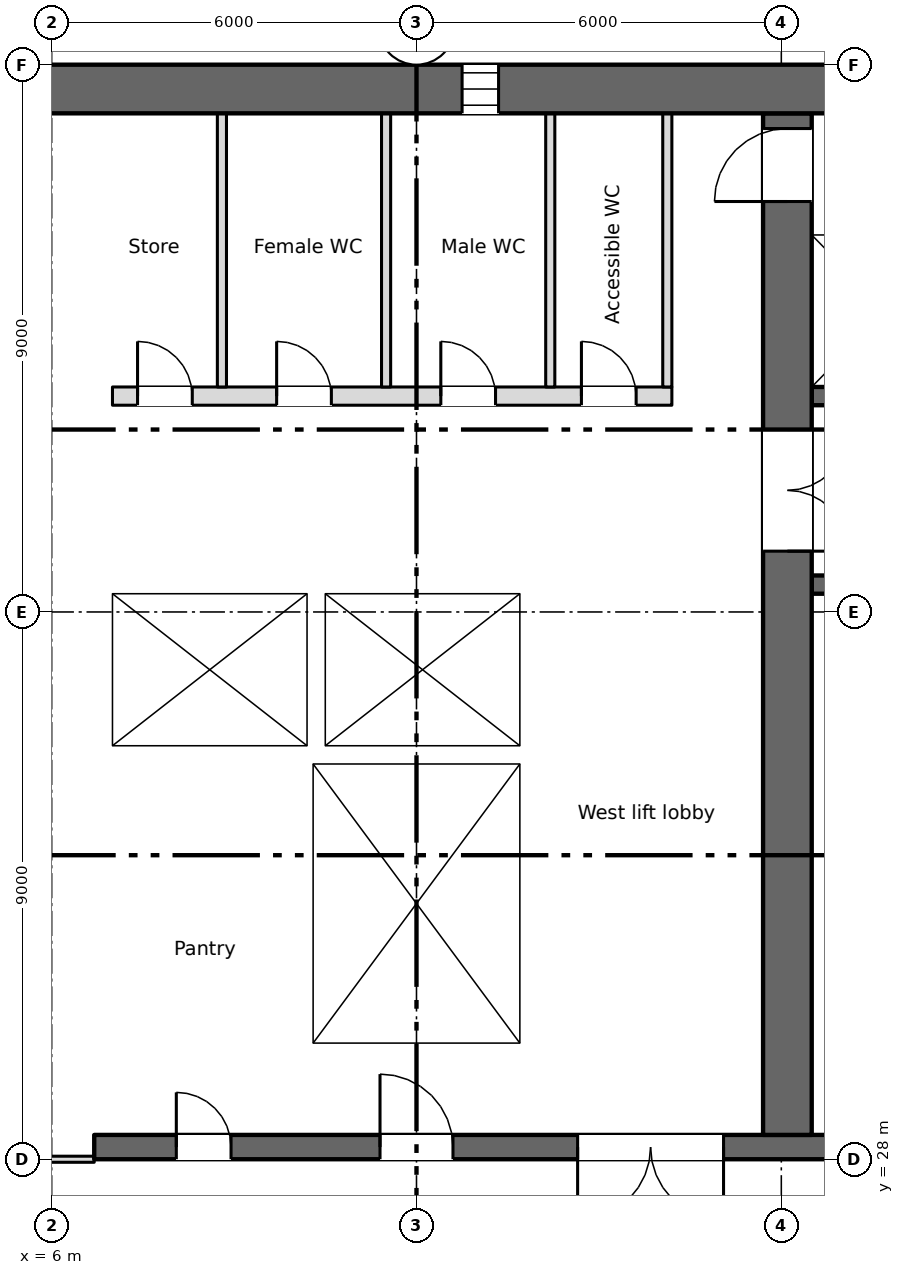
"""IFC4 building model, lengths in metres.
Left out: names, types, materials, properties, quantities, classifications, styles, units other than length and angle.
Written with IfcOpenShell. Run it as: python <this file> out.ifc"""

import sys

from ifc_helpers import new_model, si_unit, direction, frame, frame_2d, origin, place, context, subcontext, project, spatial, rectangle, extrude, element, fill, save


model = new_model("IFC4")
c1 = context("Model", 3, precision=1e-05, world=origin(), true_north=direction((0.0, 1.0)))
c2 = subcontext(c1, "Body", "Model", "MODEL_VIEW")
j1 = project(units=[si_unit("LENGTHUNIT", "METRE"), si_unit("PLANEANGLEUNIT", "RADIAN")], contexts=[c1])
p1 = place(None, origin())
s1 = spatial("IfcSite", under=j1, at=p1, CompositionType="ELEMENT")
p2 = place(p1, origin())
s2 = spatial("IfcBuilding", under=s1, at=p2, CompositionType="ELEMENT")
p3 = place(p2, frame((0.0, 0.0, 125.0)))
s3 = spatial("IfcBuildingStorey", under=s2, at=p3, CompositionType="ELEMENT", Elevation=125.0)
p4 = place(p3, frame((5.55, 45.6, 0.0), z_axis=(0.0, 0.0, 1.0), x_axis=(1.0, 0.0, 0.0)))
e1 = element("IfcWall", 1, at=p4, inside=s3, PredefinedType="SHEAR", context=c2, shape_type="SweptSolid", body=[
    extrude(rectangle(XDim=60.9, YDim=0.8, at=frame_2d((30.45, 0.0))), origin(), (0.0, 0.0, 1.0), 3.35),
])
p5 = place(p4, frame((7.2, 0.0, 0.6)))
e2 = element("IfcOpeningElement", 2, at=p5, cuts=e1, PredefinedType="OPENING", context=c2, shape_type="SweptSolid", body=[
    extrude(rectangle(XDim=0.6, YDim=2.4, at=frame_2d((0.3, 1.2))), frame((0.0, 0.41, 0.0), z_axis=(0.0, -1.0, 0.0), x_axis=(1.0, 0.0, 0.0)), (0.0, 0.0, 1.0), 0.82),
])
p6 = place(p3, frame((6.7, 28.2, 0.0), z_axis=(0.0, 0.0, 1.0), x_axis=(1.0, 0.0, 0.0)))
e3 = element("IfcWall", 3, at=p6, inside=s3, PredefinedType="SHEAR", context=c2, shape_type="SweptSolid", body=[
    extrude(rectangle(XDim=57.8, YDim=0.4, at=frame_2d((28.9, 0.0))), origin(), (0.0, 0.0, 1.0), 3.35),
])
p7 = place(p6, frame((12.062, 0.0, 0.0)))
e4 = element("IfcOpeningElement", 4, at=p7, cuts=e3, PredefinedType="OPENING", context=c2, shape_type="SweptSolid", body=[
    extrude(rectangle(XDim=0.9, YDim=2.1, at=frame_2d((0.45, 1.05))), frame((0.0, 0.21, 0.0), z_axis=(0.0, -1.0, 0.0), x_axis=(1.0, 0.0, 0.0)), (0.0, 0.0, 1.0), 0.42),
])
p8 = place(p6, frame((14.637, 0.0, 0.0)))
e5 = element("IfcOpeningElement", 5, at=p8, cuts=e3, PredefinedType="OPENING", context=c2, shape_type="SweptSolid", body=[
    extrude(rectangle(XDim=0.9, YDim=2.1, at=frame_2d((0.45, 1.05))), frame((0.0, 0.21, 0.0), z_axis=(0.0, -1.0, 0.0), x_axis=(1.0, 0.0, 0.0)), (0.0, 0.0, 1.0), 0.42),
])
p9 = place(p6, frame((49.062, 0.0, 0.0)))
e6 = element("IfcOpeningElement", 6, at=p9, cuts=e3, PredefinedType="OPENING", context=c2, shape_type="SweptSolid", body=[
    extrude(rectangle(XDim=0.9, YDim=2.1, at=frame_2d((0.45, 1.05))), frame((0.0, 0.21, 0.0), z_axis=(0.0, -1.0, 0.0), x_axis=(1.0, 0.0, 0.0)), (0.0, 0.0, 1.0), 0.42),
])
p10 = place(p6, frame((51.637, 0.0, 0.0)))
e7 = element("IfcOpeningElement", 7, at=p10, cuts=e3, PredefinedType="OPENING", context=c2, shape_type="SweptSolid", body=[
    extrude(rectangle(XDim=0.9, YDim=2.1, at=frame_2d((0.45, 1.05))), frame((0.0, 0.21, 0.0), z_axis=(0.0, -1.0, 0.0), x_axis=(1.0, 0.0, 0.0)), (0.0, 0.0, 1.0), 0.42),
])
p11 = place(p6, frame((1.35, 0.0, 0.0)))
e8 = element("IfcOpeningElement", 8, at=p11, cuts=e3, PredefinedType="OPENING", context=c2, shape_type="SweptSolid", body=[
    extrude(rectangle(XDim=0.9, YDim=2.1, at=frame_2d((0.45, 1.05))), frame((0.0, 0.21, 0.0), z_axis=(0.0, -1.0, 0.0), x_axis=(1.0, 0.0, 0.0)), (0.0, 0.0, 1.0), 0.42),
])
p12 = place(p6, frame((4.7, 0.0, 0.0)))
e9 = element("IfcOpeningElement", 9, at=p12, cuts=e3, PredefinedType="OPENING", context=c2, shape_type="SweptSolid", body=[
    extrude(rectangle(XDim=1.2, YDim=2.1, at=frame_2d((0.6, 1.05))), frame((0.0, 0.21, 0.0), z_axis=(0.0, -1.0, 0.0), x_axis=(1.0, 0.0, 0.0)), (0.0, 0.0, 1.0), 0.42),
])
p13 = place(p6, frame((31.7, 0.0, 0.0)))
e10 = element("IfcOpeningElement", 10, at=p13, cuts=e3, PredefinedType="OPENING", context=c2, shape_type="SweptSolid", body=[
    extrude(rectangle(XDim=1.2, YDim=2.1, at=frame_2d((0.6, 1.05))), frame((0.0, 0.21, 0.0), z_axis=(0.0, -1.0, 0.0), x_axis=(1.0, 0.0, 0.0)), (0.0, 0.0, 1.0), 0.42),
])
p14 = place(p6, frame((55.2, 0.0, 0.0)))
e11 = element("IfcOpeningElement", 11, at=p14, cuts=e3, PredefinedType="OPENING", context=c2, shape_type="SweptSolid", body=[
    extrude(rectangle(XDim=1.2, YDim=2.1, at=frame_2d((0.6, 1.05))), frame((0.0, 0.21, 0.0), z_axis=(0.0, -1.0, 0.0), x_axis=(1.0, 0.0, 0.0)), (0.0, 0.0, 1.0), 0.42),
])
p15 = place(p6, frame((21.7, 0.0, 0.0)))
e12 = element("IfcOpeningElement", 12, at=p15, cuts=e3, PredefinedType="OPENING", context=c2, shape_type="SweptSolid", body=[
    extrude(rectangle(XDim=1.2, YDim=2.1, at=frame_2d((0.6, 1.05))), frame((0.0, 0.21, 0.0), z_axis=(0.0, -1.0, 0.0), x_axis=(1.0, 0.0, 0.0)), (0.0, 0.0, 1.0), 0.42),
])
p16 = place(p6, frame((41.7, 0.0, 0.0)))
e13 = element("IfcOpeningElement", 13, at=p16, cuts=e3, PredefinedType="OPENING", context=c2, shape_type="SweptSolid", body=[
    extrude(rectangle(XDim=1.2, YDim=2.1, at=frame_2d((0.6, 1.05))), frame((0.0, 0.21, 0.0), z_axis=(0.0, -1.0, 0.0), x_axis=(1.0, 0.0, 0.0)), (0.0, 0.0, 1.0), 0.42),
])
p17 = place(p6, frame((24.85, 0.0, 0.0)))
e14 = element("IfcOpeningElement", 14, at=p17, cuts=e3, PredefinedType="OPENING", context=c2, shape_type="SweptSolid", body=[
    extrude(rectangle(XDim=2.4, YDim=2.1, at=frame_2d((1.2, 1.05))), frame((0.0, 0.21, 0.0), z_axis=(0.0, -1.0, 0.0), x_axis=(1.0, 0.0, 0.0)), (0.0, 0.0, 1.0), 0.42),
])
p18 = place(p6, frame((37.35, 0.0, 0.0)))
e15 = element("IfcOpeningElement", 15, at=p18, cuts=e3, PredefinedType="OPENING", context=c2, shape_type="SweptSolid", body=[
    extrude(rectangle(XDim=2.4, YDim=2.1, at=frame_2d((1.2, 1.05))), frame((0.0, 0.21, 0.0), z_axis=(0.0, -1.0, 0.0), x_axis=(1.0, 0.0, 0.0)), (0.0, 0.0, 1.0), 0.42),
])
p19 = place(p6, frame((7.95, 0.0, 0.0)))
e16 = element("IfcOpeningElement", 16, at=p19, cuts=e3, PredefinedType="OPENING", context=c2, shape_type="SweptSolid", body=[
    extrude(rectangle(XDim=2.4, YDim=2.1, at=frame_2d((1.2, 1.05))), frame((0.0, 0.21, 0.0), z_axis=(0.0, -1.0, 0.0), x_axis=(1.0, 0.0, 0.0)), (0.0, 0.0, 1.0), 0.42),
])
p20 = place(p6, frame((28.85, 0.0, 0.0)))
e17 = element("IfcOpeningElement", 17, at=p20, cuts=e3, PredefinedType="OPENING", context=c2, shape_type="SweptSolid", body=[
    extrude(rectangle(XDim=0.9, YDim=2.1, at=frame_2d((0.45, 1.05))), frame((0.0, 0.21, 0.0), z_axis=(0.0, -1.0, 0.0), x_axis=(1.0, 0.0, 0.0)), (0.0, 0.0, 1.0), 0.42),
])
p21 = place(p6, frame((34.85, 0.0, 0.0)))
e18 = element("IfcOpeningElement", 18, at=p21, cuts=e3, PredefinedType="OPENING", context=c2, shape_type="SweptSolid", body=[
    extrude(rectangle(XDim=0.9, YDim=2.1, at=frame_2d((0.45, 1.05))), frame((0.0, 0.21, 0.0), z_axis=(0.0, -1.0, 0.0), x_axis=(1.0, 0.0, 0.0)), (0.0, 0.0, 1.0), 0.42),
])
p22 = place(p3, frame((6.85, 28.4, 0.0), z_axis=(0.0, 0.0, 1.0), x_axis=(0.0, 1.0, 0.0)))
e19 = element("IfcWall", 19, at=p22, inside=s3, PredefinedType="SHEAR", context=c2, shape_type="SweptSolid", body=[
    extrude(rectangle(XDim=16.8, YDim=0.3, at=frame_2d((8.4, 0.0))), origin(), (0.0, 0.0, 1.0), 3.35),
])
p23 = place(p3, frame((18.1, 28.4, 0.0), z_axis=(0.0, 0.0, 1.0), x_axis=(0.0, 1.0, 0.0)))
e20 = element("IfcWall", 20, at=p23, inside=s3, PredefinedType="SHEAR", context=c2, shape_type="SweptSolid", body=[
    extrude(rectangle(XDim=16.8, YDim=0.8, at=frame_2d((8.4, 0.0))), origin(), (0.0, 0.0, 1.0), 3.35),
])
p24 = place(p23, frame((9.6, 0.0, 0.0)))
e21 = element("IfcOpeningElement", 21, at=p24, cuts=e20, PredefinedType="OPENING", context=c2, shape_type="SweptSolid", body=[
    extrude(rectangle(XDim=2.0, YDim=2.1, at=frame_2d((1.0, 1.05))), frame((0.0, 0.41, 0.0), z_axis=(0.0, -1.0, 0.0), x_axis=(1.0, 0.0, 0.0)), (0.0, 0.0, 1.0), 0.82),
])
p25 = place(p23, frame((15.35, 0.0, 0.0)))
e22 = element("IfcOpeningElement", 22, at=p25, cuts=e20, PredefinedType="OPENING", context=c2, shape_type="SweptSolid", body=[
    extrude(rectangle(XDim=1.2, YDim=2.1, at=frame_2d((0.6, 1.05))), frame((0.0, 0.41, 0.0), z_axis=(0.0, -1.0, 0.0), x_axis=(1.0, 0.0, 0.0)), (0.0, 0.0, 1.0), 0.82),
])
for number, where, z_axis, x_axis in (
    (23, (10.15, 28.4, 0.0), (0.0, 0.0, 1.0), (0.0, 1.0, 0.0)),
    (24, (13.85, 28.4, 0.0), (0.0, 0.0, 1.0), (0.0, 1.0, 0.0)),
):
    element("IfcWall", number, at=place(p3, frame(where, z_axis=z_axis, x_axis=x_axis)), inside=s3, PredefinedType="SHEAR", context=c2, shape_type="SweptSolid", body=[
        extrude(rectangle(XDim=6.1, YDim=0.3, at=frame_2d((3.05, 0.0))), origin(), (0.0, 0.0, 1.0), 3.35),
    ])
p26 = place(p3, frame((7.0, 34.65, 0.0), z_axis=(0.0, 0.0, 1.0), x_axis=(1.0, 0.0, 0.0)))
e25 = element("IfcWall", 25, at=p26, inside=s3, PredefinedType="SHEAR", context=c2, shape_type="SweptSolid", body=[
    extrude(rectangle(XDim=7.0, YDim=0.3, at=frame_2d((3.5, 0.0))), origin(), (0.0, 0.0, 1.0), 3.35),
])
p27 = place(p3, frame((18.5, 34.65, 0.0), z_axis=(0.0, 0.0, 1.0), x_axis=(1.0, 0.0, 0.0)))
e26 = element("IfcWall", 26, at=p27, inside=s3, PredefinedType="SHEAR", context=c2, shape_type="SweptSolid", body=[
    extrude(rectangle(XDim=12.2, YDim=0.3, at=frame_2d((6.1, 0.0))), origin(), (0.0, 0.0, 1.0), 3.35),
])
p28 = place(p27, frame((9.8, 0.0, 0.0)))
e27 = element("IfcOpeningElement", 27, at=p28, cuts=e26, PredefinedType="OPENING", context=c2, shape_type="SweptSolid", body=[
    extrude(rectangle(XDim=1.1, YDim=2.1, at=frame_2d((0.55, 1.05))), frame((0.0, 0.16, 0.0), z_axis=(0.0, -1.0, 0.0), x_axis=(1.0, 0.0, 0.0)), (0.0, 0.0, 1.0), 0.32),
])
p29 = place(p3, frame((7.0, 37.45, 0.0), z_axis=(0.0, 0.0, 1.0), x_axis=(1.0, 0.0, 0.0)))
e28 = element("IfcWall", 28, at=p29, inside=s3, PredefinedType="SHEAR", context=c2, shape_type="SweptSolid", body=[
    extrude(rectangle(XDim=7.0, YDim=0.3, at=frame_2d((3.5, 0.0))), origin(), (0.0, 0.0, 1.0), 3.35),
])
p30 = place(p3, frame((30.7, 37.45, 0.0), z_axis=(0.0, 0.0, 1.0), x_axis=(-1.0, 0.0, 0.0)))
e29 = element("IfcWall", 29, at=p30, inside=s3, PredefinedType="SHEAR", context=c2, shape_type="SweptSolid", body=[
    extrude(rectangle(XDim=12.2, YDim=0.3, at=frame_2d((6.1, 0.0))), origin(), (0.0, 0.0, 1.0), 3.35),
])
p31 = place(p30, frame((7.4, 0.0, 0.0)))
e30 = element("IfcOpeningElement", 30, at=p31, cuts=e29, PredefinedType="OPENING", context=c2, shape_type="SweptSolid", body=[
    extrude(rectangle(XDim=0.9, YDim=2.1, at=frame_2d((0.45, 1.05))), frame((0.0, 0.16, 0.0), z_axis=(0.0, -1.0, 0.0), x_axis=(1.0, 0.0, 0.0)), (0.0, 0.0, 1.0), 0.32),
])
p32 = place(p3, frame((13.85, 34.8, 0.0), z_axis=(0.0, 0.0, 1.0), x_axis=(0.0, 1.0, 0.0)))
e31 = element("IfcWall", 31, at=p32, inside=s3, PredefinedType="SHEAR", context=c2, shape_type="SweptSolid", body=[
    extrude(rectangle(XDim=2.5, YDim=0.3, at=frame_2d((1.25, 0.0))), origin(), (0.0, 0.0, 1.0), 3.35),
])
p33 = place(p3, frame((18.5, 40.55, 0.0), z_axis=(0.0, 0.0, 1.0), x_axis=(1.0, 0.0, 0.0)))
e32 = element("IfcWall", 32, at=p33, inside=s3, PredefinedType="SHEAR", context=c2, shape_type="SweptSolid", body=[
    extrude(rectangle(XDim=41.0, YDim=0.3, at=frame_2d((20.5, 0.0))), origin(), (0.0, 0.0, 1.0), 3.35),
])
p34 = place(p33, frame((18.65, 0.0, 0.0)))
e33 = element("IfcOpeningElement", 33, at=p34, cuts=e32, PredefinedType="OPENING", context=c2, shape_type="SweptSolid", body=[
    extrude(rectangle(XDim=0.9, YDim=2.1, at=frame_2d((0.45, 1.05))), frame((0.0, 0.16, 0.0), z_axis=(0.0, -1.0, 0.0), x_axis=(1.0, 0.0, 0.0)), (0.0, 0.0, 1.0), 0.32),
])
p35 = place(p33, frame((6.175, 0.0, 0.0)))
e34 = element("IfcOpeningElement", 34, at=p35, cuts=e32, PredefinedType="OPENING", context=c2, shape_type="SweptSolid", body=[
    extrude(rectangle(XDim=1.1, YDim=2.1, at=frame_2d((0.55, 1.05))), frame((0.0, 0.16, 0.0), z_axis=(0.0, -1.0, 0.0), x_axis=(1.0, 0.0, 0.0)), (0.0, 0.0, 1.0), 0.32),
])
p36 = place(p33, frame((8.925, 0.0, 0.0)))
e35 = element("IfcOpeningElement", 35, at=p36, cuts=e32, PredefinedType="OPENING", context=c2, shape_type="SweptSolid", body=[
    extrude(rectangle(XDim=1.1, YDim=2.1, at=frame_2d((0.55, 1.05))), frame((0.0, 0.16, 0.0), z_axis=(0.0, -1.0, 0.0), x_axis=(1.0, 0.0, 0.0)), (0.0, 0.0, 1.0), 0.32),
])
p37 = place(p33, frame((11.675, 0.0, 0.0)))
e36 = element("IfcOpeningElement", 36, at=p37, cuts=e32, PredefinedType="OPENING", context=c2, shape_type="SweptSolid", body=[
    extrude(rectangle(XDim=1.1, YDim=2.1, at=frame_2d((0.55, 1.05))), frame((0.0, 0.16, 0.0), z_axis=(0.0, -1.0, 0.0), x_axis=(1.0, 0.0, 0.0)), (0.0, 0.0, 1.0), 0.32),
])
p38 = place(p33, frame((30.925, 0.0, 0.0)))
e37 = element("IfcOpeningElement", 37, at=p38, cuts=e32, PredefinedType="OPENING", context=c2, shape_type="SweptSolid", body=[
    extrude(rectangle(XDim=1.1, YDim=2.1, at=frame_2d((0.55, 1.05))), frame((0.0, 0.16, 0.0), z_axis=(0.0, -1.0, 0.0), x_axis=(1.0, 0.0, 0.0)), (0.0, 0.0, 1.0), 0.32),
])
p39 = place(p33, frame((33.675, 0.0, 0.0)))
e38 = element("IfcOpeningElement", 38, at=p39, cuts=e32, PredefinedType="OPENING", context=c2, shape_type="SweptSolid", body=[
    extrude(rectangle(XDim=1.1, YDim=2.1, at=frame_2d((0.55, 1.05))), frame((0.0, 0.16, 0.0), z_axis=(0.0, -1.0, 0.0), x_axis=(1.0, 0.0, 0.0)), (0.0, 0.0, 1.0), 0.32),
])
p40 = place(p33, frame((36.375, 0.0, 0.0)))
e39 = element("IfcOpeningElement", 39, at=p40, cuts=e32, PredefinedType="OPENING", context=c2, shape_type="SweptSolid", body=[
    extrude(rectangle(XDim=1.2, YDim=2.1, at=frame_2d((0.6, 1.05))), frame((0.0, 0.16, 0.0), z_axis=(0.0, -1.0, 0.0), x_axis=(1.0, 0.0, 0.0)), (0.0, 0.0, 1.0), 0.32),
])
p41 = place(p33, frame((39.15, 0.0, 0.0)))
e40 = element("IfcOpeningElement", 40, at=p41, cuts=e32, PredefinedType="OPENING", context=c2, shape_type="SweptSolid", body=[
    extrude(rectangle(XDim=1.2, YDim=2.1, at=frame_2d((0.6, 1.05))), frame((0.0, 0.16, 0.0), z_axis=(0.0, -1.0, 0.0), x_axis=(1.0, 0.0, 0.0)), (0.0, 0.0, 1.0), 0.32),
])
p42 = place(p3, frame((18.5, 43.35, 0.0), z_axis=(0.0, 0.0, 1.0), x_axis=(1.0, 0.0, 0.0)))
e41 = element("IfcWall", 41, at=p42, inside=s3, PredefinedType="SHEAR", context=c2, shape_type="SweptSolid", body=[
    extrude(rectangle(XDim=41.0, YDim=0.3, at=frame_2d((20.5, 0.0))), origin(), (0.0, 0.0, 1.0), 3.35),
])
p43 = place(p3, frame((7.0, 40.55, 0.0), z_axis=(0.0, 0.0, 1.0), x_axis=(1.0, 0.0, 0.0)))
e42 = element("IfcWall", 42, at=p43, inside=s3, PredefinedType="PARTITIONING", context=c2, shape_type="SweptSolid", body=[
    extrude(rectangle(XDim=9.2, YDim=0.3, at=frame_2d((4.6, 0.0))), origin(), (0.0, 0.0, 1.0), 3.35),
])
p44 = place(p43, frame((0.413, 0.0, 0.0)))
e43 = element("IfcOpeningElement", 43, at=p44, cuts=e42, PredefinedType="OPENING", context=c2, shape_type="SweptSolid", body=[
    extrude(rectangle(XDim=0.9, YDim=2.1, at=frame_2d((0.45, 1.05))), frame((0.0, 0.16, 0.0), z_axis=(0.0, -1.0, 0.0), x_axis=(1.0, 0.0, 0.0)), (0.0, 0.0, 1.0), 0.32),
])
p45 = place(p43, frame((2.7, 0.0, 0.0)))
e44 = element("IfcOpeningElement", 44, at=p45, cuts=e42, PredefinedType="OPENING", context=c2, shape_type="SweptSolid", body=[
    extrude(rectangle(XDim=0.9, YDim=2.1, at=frame_2d((0.45, 1.05))), frame((0.0, 0.16, 0.0), z_axis=(0.0, -1.0, 0.0), x_axis=(1.0, 0.0, 0.0)), (0.0, 0.0, 1.0), 0.32),
])
p46 = place(p43, frame((5.4, 0.0, 0.0)))
e45 = element("IfcOpeningElement", 45, at=p46, cuts=e42, PredefinedType="OPENING", context=c2, shape_type="SweptSolid", body=[
    extrude(rectangle(XDim=0.9, YDim=2.1, at=frame_2d((0.45, 1.05))), frame((0.0, 0.16, 0.0), z_axis=(0.0, -1.0, 0.0), x_axis=(1.0, 0.0, 0.0)), (0.0, 0.0, 1.0), 0.32),
])
p47 = place(p43, frame((7.712, 0.0, 0.0)))
e46 = element("IfcOpeningElement", 46, at=p47, cuts=e42, PredefinedType="OPENING", context=c2, shape_type="SweptSolid", body=[
    extrude(rectangle(XDim=0.9, YDim=2.1, at=frame_2d((0.45, 1.05))), frame((0.0, 0.16, 0.0), z_axis=(0.0, -1.0, 0.0), x_axis=(1.0, 0.0, 0.0)), (0.0, 0.0, 1.0), 0.32),
])
p48 = place(p3, frame((10.35, 34.8, 0.0), z_axis=(0.0, 0.0, 1.0), x_axis=(0.0, 1.0, 0.0)))
e47 = element("IfcWall", 47, at=p48, inside=s3, PredefinedType="SHEAR", context=c2, shape_type="SweptSolid", body=[
    extrude(rectangle(XDim=2.5, YDim=0.3, at=frame_2d((1.25, 0.0))), origin(), (0.0, 0.0, 1.0), 3.35),
])
for number, where, z_axis, x_axis in (
    (48, (16.125, 40.7, 0.0), (0.0, 0.0, 1.0), (0.0, 1.0, 0.0)),
    (49, (8.8, 40.7, 0.0), (0.0, 0.0, 1.0), (0.0, 1.0, 0.0)),
    (50, (11.5, 40.7, 0.0), (0.0, 0.0, 1.0), (0.0, 1.0, 0.0)),
    (51, (14.2, 40.7, 0.0), (0.0, 0.0, 1.0), (0.0, 1.0, 0.0)),
):
    element("IfcWall", number, at=place(p3, frame(where, z_axis=z_axis, x_axis=x_axis)), inside=s3, PredefinedType="PARTITIONING", context=c2, shape_type="SweptSolid", body=[
        extrude(rectangle(XDim=4.5, YDim=0.15, at=frame_2d((2.25, 0.0))), origin(), (0.0, 0.0, 1.0), 3.35),
    ])
p49 = place(p3, frame((0.7, 28.0, 0.0), z_axis=(0.0, 0.0, 1.0), x_axis=(1.0, 0.0, 0.0)))
e52 = element("IfcWall", 52, at=p49, inside=s3, PredefinedType="PARTITIONING", context=c2, shape_type="SweptSolid", body=[
    extrude(rectangle(XDim=6.0, YDim=0.1, at=frame_2d((3.0, 0.0))), origin(), (0.0, 0.0, 1.0), 3.35),
])
p50 = place(p49, frame((2.1, 0.0, 0.0)))
e53 = element("IfcOpeningElement", 53, at=p50, cuts=e52, PredefinedType="OPENING", context=c2, shape_type="SweptSolid", body=[
    extrude(rectangle(XDim=1.8, YDim=2.1, at=frame_2d((0.9, 1.05))), frame((0.0, 0.06, 0.0), z_axis=(0.0, -1.0, 0.0), x_axis=(1.0, 0.0, 0.0)), (0.0, 0.0, 1.0), 0.12),
])
p51 = place(p5, origin())
e54 = element("IfcWindow", 54, at=p51, inside=s3, PartitioningType="SINGLE_PANEL", PredefinedType="WINDOW", context=c2, shape_type="SweptSolid", body=[
    extrude(rectangle(XDim=0.6, YDim=2.4, at=frame_2d((0.3, 1.2))), frame((0.0, 0.03, 0.0), z_axis=(0.0, -1.0, 0.0), x_axis=(1.0, 0.0, 0.0)), (0.0, 0.0, 1.0), 0.06),
])
fill(e2, e54)
p52 = place(p11, origin())
e55 = element("IfcDoor", 55, at=p52, inside=s3, OperationType="SINGLE_SWING_LEFT", PredefinedType="DOOR", context=c2, shape_type="SweptSolid", body=[
    extrude(rectangle(XDim=0.9, YDim=2.1, at=frame_2d((0.45, 1.05))), frame((0.0, 0.025, 0.0), z_axis=(0.0, -1.0, 0.0), x_axis=(1.0, 0.0, 0.0)), (0.0, 0.0, 1.0), 0.05),
])
fill(e8, e55)
p53 = place(p44, origin())
e56 = element("IfcDoor", 56, at=p53, inside=s3, OperationType="SINGLE_SWING_LEFT", PredefinedType="DOOR", context=c2, shape_type="SweptSolid", body=[
    extrude(rectangle(XDim=0.9, YDim=2.1, at=frame_2d((0.45, 1.05))), frame((0.0, 0.025, 0.0), z_axis=(0.0, -1.0, 0.0), x_axis=(1.0, 0.0, 0.0)), (0.0, 0.0, 1.0), 0.05),
])
fill(e43, e56)
p54 = place(p45, origin())
e57 = element("IfcDoor", 57, at=p54, inside=s3, OperationType="SINGLE_SWING_LEFT", PredefinedType="DOOR", context=c2, shape_type="SweptSolid", body=[
    extrude(rectangle(XDim=0.9, YDim=2.1, at=frame_2d((0.45, 1.05))), frame((0.0, 0.025, 0.0), z_axis=(0.0, -1.0, 0.0), x_axis=(1.0, 0.0, 0.0)), (0.0, 0.0, 1.0), 0.05),
])
fill(e44, e57)
p55 = place(p46, origin())
e58 = element("IfcDoor", 58, at=p55, inside=s3, OperationType="SINGLE_SWING_LEFT", PredefinedType="DOOR", context=c2, shape_type="SweptSolid", body=[
    extrude(rectangle(XDim=0.9, YDim=2.1, at=frame_2d((0.45, 1.05))), frame((0.0, 0.025, 0.0), z_axis=(0.0, -1.0, 0.0), x_axis=(1.0, 0.0, 0.0)), (0.0, 0.0, 1.0), 0.05),
])
fill(e45, e58)
p56 = place(p47, origin())
e59 = element("IfcDoor", 59, at=p56, inside=s3, OperationType="SINGLE_SWING_LEFT", PredefinedType="DOOR", context=c2, shape_type="SweptSolid", body=[
    extrude(rectangle(XDim=0.9, YDim=2.1, at=frame_2d((0.45, 1.05))), frame((0.0, 0.025, 0.0), z_axis=(0.0, -1.0, 0.0), x_axis=(1.0, 0.0, 0.0)), (0.0, 0.0, 1.0), 0.05),
])
fill(e46, e59)
p57 = place(p12, origin())
e60 = element("IfcDoor", 60, at=p57, inside=s3, OperationType="SINGLE_SWING_LEFT", PredefinedType="DOOR", context=c2, shape_type="SweptSolid", body=[
    extrude(rectangle(XDim=1.2, YDim=2.1, at=frame_2d((0.6, 1.05))), frame((0.0, 0.025, 0.0), z_axis=(0.0, -1.0, 0.0), x_axis=(1.0, 0.0, 0.0)), (0.0, 0.0, 1.0), 0.05),
])
fill(e9, e60)
p58 = place(p19, origin())
e61 = element("IfcDoor", 61, at=p58, inside=s3, OperationType="DOUBLE_DOOR_SINGLE_SWING", PredefinedType="DOOR", context=c2, shape_type="SweptSolid", body=[
    extrude(rectangle(XDim=2.4, YDim=2.1, at=frame_2d((1.2, 1.05))), frame((0.0, 0.025, 0.0), z_axis=(0.0, -1.0, 0.0), x_axis=(1.0, 0.0, 0.0)), (0.0, 0.0, 1.0), 0.05),
])
fill(e16, e61)
p59 = place(p24, origin())
e62 = element("IfcDoor", 62, at=p59, inside=s3, OperationType="DOUBLE_DOOR_SINGLE_SWING", PredefinedType="DOOR", context=c2, shape_type="SweptSolid", body=[
    extrude(rectangle(XDim=2.0, YDim=2.1, at=frame_2d((1.0, 1.05))), frame((0.0, 0.025, 0.0), z_axis=(0.0, -1.0, 0.0), x_axis=(1.0, 0.0, 0.0)), (0.0, 0.0, 1.0), 0.05),
])
fill(e21, e62)
p60 = place(p25, origin())
e63 = element("IfcDoor", 63, at=p60, inside=s3, OperationType="SINGLE_SWING_LEFT", PredefinedType="DOOR", context=c2, shape_type="SweptSolid", body=[
    extrude(rectangle(XDim=1.2, YDim=2.1, at=frame_2d((0.6, 1.05))), frame((0.0, 0.025, 0.0), z_axis=(0.0, -1.0, 0.0), x_axis=(1.0, 0.0, 0.0)), (0.0, 0.0, 1.0), 0.05),
])
fill(e22, e63)
save(model, sys.argv[1])
